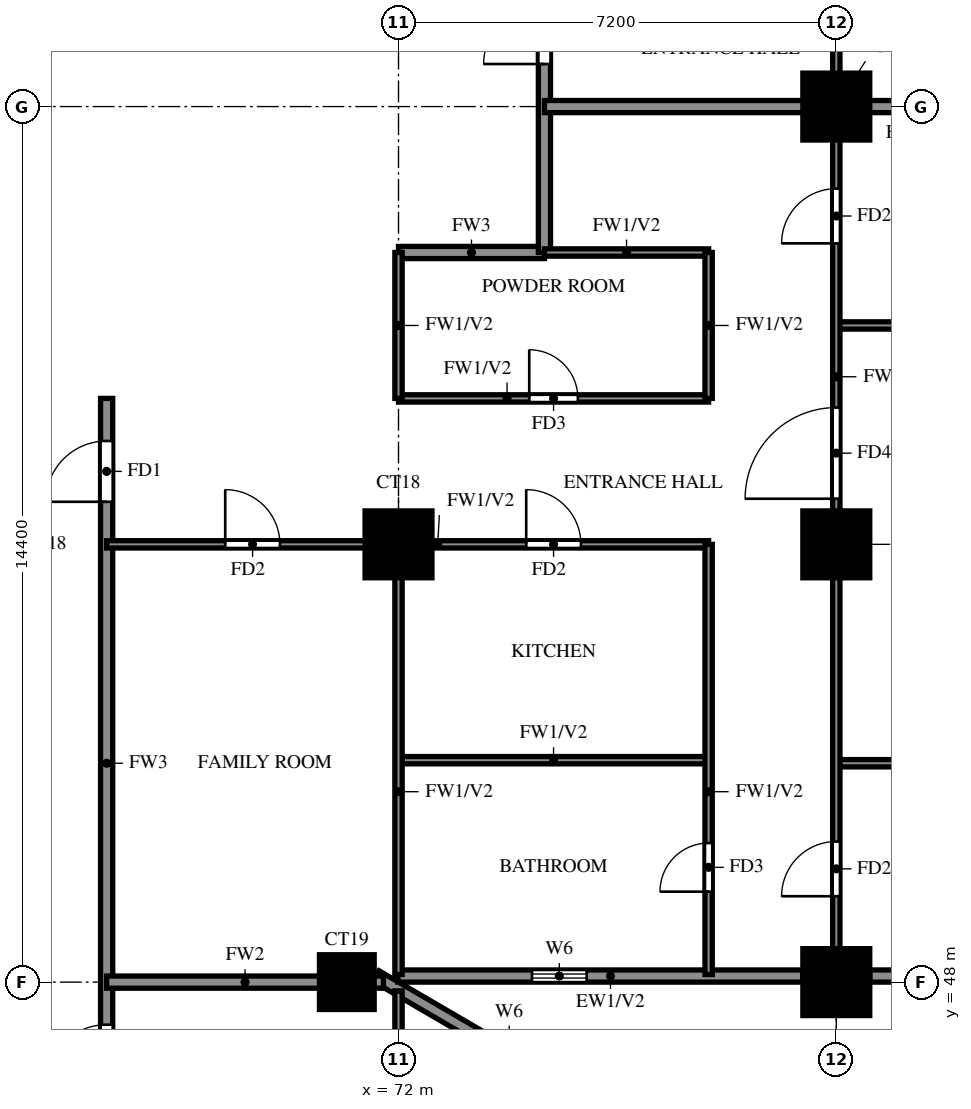
"""IFC4 building model, lengths in metres.
Left out: names, types, materials, properties, quantities, classifications, styles, units other than length and angle.
Written with IfcOpenShell. Run it as: python <this file> out.ifc"""

import sys

from ifc_helpers import new_model, si_unit, direction, frame, frame_2d, origin, origin_2d, place, context, subcontext, project, spatial, rectangle, extrude, source, transform, mapped, element, fill, save


model = new_model("IFC4")
c1 = context("Model", 3, precision=1e-05, world=origin(), true_north=direction((0.0, 1.0)))
c2 = subcontext(c1, "Body", "Model", "MODEL_VIEW")
j1 = project(units=[si_unit("LENGTHUNIT", "METRE"), si_unit("PLANEANGLEUNIT", "RADIAN")], contexts=[c1])
p1 = place(None, origin())
s1 = spatial("IfcSite", under=j1, at=p1, CompositionType="ELEMENT")
p2 = place(p1, origin())
s2 = spatial("IfcBuilding", under=s1, at=p2, CompositionType="ELEMENT")
p3 = place(p2, frame((0.0, 0.0, 130.5)))
s3 = spatial("IfcBuildingStorey", under=s2, at=p3, CompositionType="ELEMENT", Elevation=130.5)
m1 = source(origin(), c2, "Body", "SweptSolid", [
    extrude(rectangle(XDim=0.9, YDim=0.9, at=origin_2d()), origin(), (0.0, 0.0, 1.0), 3.2),
])
p4 = place(p3, frame((71.15, 48.0, 0.0), z_axis=(0.0, 0.0, 1.0), x_axis=(1.0, 0.0, 0.0)))
e1 = element("IfcColumn", 1, at=p4, inside=s3, PredefinedType="COLUMN", context=c2, shape_type="MappedRepresentation", body=[
    mapped(m1, transform((0.0, 0.0, 0.0))),
])
m2 = source(origin(), c2, "Body", "SweptSolid", [
    extrude(rectangle(XDim=1.1, YDim=1.1, at=origin_2d()), origin(), (0.0, 0.0, 1.0), 3.2),
])
for number, where, z_axis, x_axis in (
    (2, (79.2, 48.0, 0.0), (0.0, 0.0, 1.0), (1.0, 0.0, 0.0)),
    (3, (72.0, 55.2, 0.0), (0.0, 0.0, 1.0), (1.0, 0.0, 0.0)),
    (4, (79.2, 55.2, 0.0), (0.0, 0.0, 1.0), (1.0, 0.0, 0.0)),
    (5, (79.2, 62.4, 0.0), (0.0, 0.0, 1.0), (1.0, 0.0, 0.0)),
):
    element("IfcColumn", number, at=place(p3, frame(where, z_axis=z_axis, x_axis=x_axis)), inside=s3, PredefinedType="COLUMN", context=c2, shape_type="MappedRepresentation", body=[
        mapped(m2, transform((0.0, 0.0, 0.0))),
    ])
p5 = place(p3, frame((85.719, 39.881, 0.0), z_axis=(0.0, 0.0, 1.0), x_axis=(-0.86377618652, 0.503875678716, 0.0)))
e6 = element("IfcWall", 6, at=p5, inside=s3, PredefinedType="SOLIDWALL", context=c2, shape_type="SweptSolid", body=[
    extrude(rectangle(XDim=16.311, YDim=0.2, at=frame_2d((8.156, 0.0))), origin(), (0.0, 0.0, 1.0), 3.2),
])
p6 = place(p5, frame((13.326, 0.0, 1.5)))
e7 = element("IfcOpeningElement", 7, at=p6, cuts=e6, PredefinedType="OPENING", context=c2, shape_type="SweptSolid", body=[
    extrude(rectangle(XDim=0.9, YDim=0.9, at=frame_2d((0.45, 0.45))), frame((0.0, 0.11, 0.0), z_axis=(0.0, -1.0, 0.0), x_axis=(1.0, 0.0, 0.0)), (0.0, 0.0, 1.0), 0.22),
])
p7 = place(p3, frame((71.99, 48.1, 0.0), z_axis=(0.0, 0.0, 1.0), x_axis=(1.0, 0.0, 0.0)))
e8 = element("IfcWall", 8, at=p7, inside=s3, PredefinedType="SOLIDWALL", context=c2, shape_type="SweptSolid", body=[
    extrude(rectangle(XDim=6.66, YDim=0.2, at=frame_2d((3.33, 0.0))), origin(), (0.0, 0.0, 1.0), 3.2),
])
p8 = place(p7, frame((2.205, 0.0, 1.5)))
e9 = element("IfcOpeningElement", 9, at=p8, cuts=e8, PredefinedType="OPENING", context=c2, shape_type="SweptSolid", body=[
    extrude(rectangle(XDim=0.9, YDim=0.9, at=frame_2d((0.45, 0.45))), frame((0.0, 0.11, 0.0), z_axis=(0.0, -1.0, 0.0), x_axis=(1.0, 0.0, 0.0)), (0.0, 0.0, 1.0), 0.22),
])
p9 = place(p3, frame((79.75, 48.1, 0.0), z_axis=(0.0, 0.0, 1.0), x_axis=(1.0, 0.0, 0.0)))
e10 = element("IfcWall", 10, at=p9, inside=s3, PredefinedType="SOLIDWALL", context=c2, shape_type="SweptSolid", body=[
    extrude(rectangle(XDim=5.6, YDim=0.2, at=frame_2d((2.8, 0.0))), origin(), (0.0, 0.0, 1.0), 3.2),
])
p10 = place(p9, frame((1.6, 0.0, 0.6)))
e11 = element("IfcOpeningElement", 11, at=p10, cuts=e10, PredefinedType="OPENING", context=c2, shape_type="SweptSolid", body=[
    extrude(rectangle(XDim=2.4, YDim=2.4, at=frame_2d((1.2, 1.2))), frame((0.0, 0.11, 0.0), z_axis=(0.0, -1.0, 0.0), x_axis=(1.0, 0.0, 0.0)), (0.0, 0.0, 1.0), 0.22),
])
p11 = place(p3, frame((72.0, 60.0, 0.0), z_axis=(0.0, 0.0, 1.0), x_axis=(1.0, 0.0, 0.0)))
e12 = element("IfcWall", 12, at=p11, inside=s3, PredefinedType="SOLIDWALL", context=c2, shape_type="SweptSolid", body=[
    extrude(rectangle(XDim=2.4, YDim=0.2, at=frame_2d((1.2, 0.0))), origin(), (0.0, 0.0, 1.0), 3.2),
])
p12 = place(p3, frame((67.2, 45.6, 0.0), z_axis=(0.0, 0.0, 1.0), x_axis=(0.0, 1.0, 0.0)))
e13 = element("IfcWall", 13, at=p12, inside=s3, PredefinedType="SOLIDWALL", context=c2, shape_type="SweptSolid", body=[
    extrude(rectangle(XDim=12.0, YDim=0.2, at=frame_2d((6.0, 0.0))), origin(), (0.0, 0.0, 1.0), 3.2),
])
p13 = place(p12, frame((10.3, 0.0, 0.0)))
e14 = element("IfcOpeningElement", 14, at=p13, cuts=e13, PredefinedType="OPENING", context=c2, shape_type="SweptSolid", body=[
    extrude(rectangle(XDim=1.0, YDim=2.1, at=frame_2d((0.5, 1.05))), frame((0.0, 0.11, 0.0), z_axis=(0.0, -1.0, 0.0), x_axis=(1.0, 0.0, 0.0)), (0.0, 0.0, 1.0), 0.22),
])
p14 = place(p12, frame((0.7, 0.0, 0.0)))
e15 = element("IfcOpeningElement", 15, at=p14, cuts=e13, PredefinedType="OPENING", context=c2, shape_type="SweptSolid", body=[
    extrude(rectangle(XDim=1.0, YDim=2.1, at=frame_2d((0.5, 1.05))), frame((0.0, 0.11, 0.0), z_axis=(0.0, -1.0, 0.0), x_axis=(1.0, 0.0, 0.0)), (0.0, 0.0, 1.0), 0.22),
])
p15 = place(p3, frame((74.4, 60.0, 0.0), z_axis=(0.0, 0.0, 1.0), x_axis=(0.0, 1.0, 0.0)))
e16 = element("IfcWall", 16, at=p15, inside=s3, PredefinedType="SOLIDWALL", context=c2, shape_type="SweptSolid", body=[
    extrude(rectangle(XDim=9.45, YDim=0.2, at=frame_2d((4.725, 0.0))), origin(), (0.0, 0.0, 1.0), 3.2),
])
p16 = place(p15, frame((3.1, 0.0, 0.0)))
e17 = element("IfcOpeningElement", 17, at=p16, cuts=e16, PredefinedType="OPENING", context=c2, shape_type="SweptSolid", body=[
    extrude(rectangle(XDim=1.0, YDim=2.1, at=frame_2d((0.5, 1.05))), frame((0.0, 0.11, 0.0), z_axis=(0.0, -1.0, 0.0), x_axis=(1.0, 0.0, 0.0)), (0.0, 0.0, 1.0), 0.22),
])
p17 = place(p3, frame((67.2, 48.0, 0.0), z_axis=(0.0, 0.0, 1.0), x_axis=(1.0, 0.0, 0.0)))
e18 = element("IfcWall", 18, at=p17, inside=s3, PredefinedType="SOLIDWALL", context=c2, shape_type="SweptSolid", body=[
    extrude(rectangle(XDim=4.552, YDim=0.2, at=frame_2d((2.276, 0.0))), origin(), (0.0, 0.0, 1.0), 3.2),
])
p18 = place(p3, frame((74.4, 62.4, 0.0), z_axis=(0.0, 0.0, 1.0), x_axis=(1.0, 0.0, 0.0)))
e19 = element("IfcWall", 19, at=p18, inside=s3, PredefinedType="SOLIDWALL", context=c2, shape_type="SweptSolid", body=[
    extrude(rectangle(XDim=11.875, YDim=0.2, at=frame_2d((5.938, 0.0))), origin(), (0.0, 0.0, 1.0), 3.2),
])
p19 = place(p3, frame((79.2, 51.6, 0.0), z_axis=(0.0, 0.0, 1.0), x_axis=(1.0, 0.0, 0.0)))
e20 = element("IfcWall", 20, at=p19, inside=s3, PredefinedType="PARTITIONING", context=c2, shape_type="SweptSolid", body=[
    extrude(rectangle(XDim=7.075, YDim=0.12, at=frame_2d((3.538, 0.0))), origin(), (0.0, 0.0, 1.0), 2.3),
])
p20 = place(p3, frame((72.0, 51.65, 0.0), z_axis=(0.0, 0.0, 1.0), x_axis=(1.0, 0.0, 0.0)))
e21 = element("IfcWall", 21, at=p20, inside=s3, PredefinedType="PARTITIONING", context=c2, shape_type="SweptSolid", body=[
    extrude(rectangle(XDim=5.1, YDim=0.12, at=frame_2d((2.55, 0.0))), origin(), (0.0, 0.0, 1.0), 3.2),
])
p21 = place(p3, frame((67.2, 55.2, 0.0), z_axis=(0.0, 0.0, 1.0), x_axis=(1.0, 0.0, 0.0)))
e22 = element("IfcWall", 22, at=p21, inside=s3, PredefinedType="PARTITIONING", context=c2, shape_type="SweptSolid", body=[
    extrude(rectangle(XDim=9.9, YDim=0.12, at=frame_2d((4.95, 0.0))), origin(), (0.0, 0.0, 1.0), 3.2),
])
p22 = place(p21, frame((6.9, 0.0, 0.0)))
e23 = element("IfcOpeningElement", 23, at=p22, cuts=e22, PredefinedType="OPENING", context=c2, shape_type="SweptSolid", body=[
    extrude(rectangle(XDim=0.9, YDim=2.1, at=frame_2d((0.45, 1.05))), frame((0.0, 0.07, 0.0), z_axis=(0.0, -1.0, 0.0), x_axis=(1.0, 0.0, 0.0)), (0.0, 0.0, 1.0), 0.14),
])
p23 = place(p21, frame((1.95, 0.0, 0.0)))
e24 = element("IfcOpeningElement", 24, at=p23, cuts=e22, PredefinedType="OPENING", context=c2, shape_type="SweptSolid", body=[
    extrude(rectangle(XDim=0.9, YDim=2.1, at=frame_2d((0.45, 1.05))), frame((0.0, 0.07, 0.0), z_axis=(0.0, -1.0, 0.0), x_axis=(1.0, 0.0, 0.0)), (0.0, 0.0, 1.0), 0.14),
])
p24 = place(p3, frame((72.0, 57.6, 0.0), z_axis=(0.0, 0.0, 1.0), x_axis=(1.0, 0.0, 0.0)))
e25 = element("IfcWall", 25, at=p24, inside=s3, PredefinedType="PARTITIONING", context=c2, shape_type="SweptSolid", body=[
    extrude(rectangle(XDim=5.1, YDim=0.12, at=frame_2d((2.55, 0.0))), origin(), (0.0, 0.0, 1.0), 3.2),
])
p25 = place(p24, frame((2.15, 0.0, 0.0)))
e26 = element("IfcOpeningElement", 26, at=p25, cuts=e25, PredefinedType="OPENING", context=c2, shape_type="SweptSolid", body=[
    extrude(rectangle(XDim=0.8, YDim=2.1, at=frame_2d((0.4, 1.05))), frame((0.0, 0.07, 0.0), z_axis=(0.0, -1.0, 0.0), x_axis=(1.0, 0.0, 0.0)), (0.0, 0.0, 1.0), 0.14),
])
p26 = place(p3, frame((79.2, 58.8, 0.0), z_axis=(0.0, 0.0, 1.0), x_axis=(1.0, 0.0, 0.0)))
e27 = element("IfcWall", 27, at=p26, inside=s3, PredefinedType="PARTITIONING", context=c2, shape_type="SweptSolid", body=[
    extrude(rectangle(XDim=7.075, YDim=0.12, at=frame_2d((3.538, 0.0))), origin(), (0.0, 0.0, 1.0), 2.3),
])
p27 = place(p3, frame((74.4, 60.0, 0.0), z_axis=(0.0, 0.0, 1.0), x_axis=(1.0, 0.0, 0.0)))
e28 = element("IfcWall", 28, at=p27, inside=s3, PredefinedType="PARTITIONING", context=c2, shape_type="SweptSolid", body=[
    extrude(rectangle(XDim=2.7, YDim=0.12, at=frame_2d((1.35, 0.0))), origin(), (0.0, 0.0, 1.0), 3.2),
])
p28 = place(p3, frame((72.0, 39.725, 0.0), z_axis=(0.0, 0.0, 1.0), x_axis=(0.0, 1.0, 0.0)))
e29 = element("IfcWall", 29, at=p28, inside=s3, PredefinedType="PARTITIONING", context=c2, shape_type="SweptSolid", body=[
    extrude(rectangle(XDim=8.13, YDim=0.12, at=frame_2d((4.065, 0.0))), origin(), (0.0, 0.0, 1.0), 2.3),
])
p29 = place(p28, frame((1.788, 0.0, 0.0)))
e30 = element("IfcOpeningElement", 30, at=p29, cuts=e29, PredefinedType="OPENING", context=c2, shape_type="SweptSolid", body=[
    extrude(rectangle(XDim=0.9, YDim=2.1, at=frame_2d((0.45, 1.05))), frame((0.0, 0.07, 0.0), z_axis=(0.0, -1.0, 0.0), x_axis=(1.0, 0.0, 0.0)), (0.0, 0.0, 1.0), 0.14),
])
p30 = place(p28, frame((4.575, 0.0, 0.0)))
e31 = element("IfcOpeningElement", 31, at=p30, cuts=e29, PredefinedType="OPENING", context=c2, shape_type="SweptSolid", body=[
    extrude(rectangle(XDim=0.8, YDim=2.1, at=frame_2d((0.4, 1.05))), frame((0.0, 0.07, 0.0), z_axis=(0.0, -1.0, 0.0), x_axis=(1.0, 0.0, 0.0)), (0.0, 0.0, 1.0), 0.14),
])
p31 = place(p3, frame((72.0, 48.125, 0.0), z_axis=(0.0, 0.0, 1.0), x_axis=(0.0, 1.0, 0.0)))
e32 = element("IfcWall", 32, at=p31, inside=s3, PredefinedType="PARTITIONING", context=c2, shape_type="SweptSolid", body=[
    extrude(rectangle(XDim=7.075, YDim=0.12, at=frame_2d((3.538, 0.0))), origin(), (0.0, 0.0, 1.0), 3.2),
])
p32 = place(p3, frame((72.0, 57.6, 0.0), z_axis=(0.0, 0.0, 1.0), x_axis=(0.0, 1.0, 0.0)))
e33 = element("IfcWall", 33, at=p32, inside=s3, PredefinedType="PARTITIONING", context=c2, shape_type="SweptSolid", body=[
    extrude(rectangle(XDim=2.4, YDim=0.12, at=frame_2d((1.2, 0.0))), origin(), (0.0, 0.0, 1.0), 3.2),
])
p33 = place(p3, frame((77.1, 48.125, 0.0), z_axis=(0.0, 0.0, 1.0), x_axis=(0.0, 1.0, 0.0)))
e34 = element("IfcWall", 34, at=p33, inside=s3, PredefinedType="PARTITIONING", context=c2, shape_type="SweptSolid", body=[
    extrude(rectangle(XDim=7.075, YDim=0.12, at=frame_2d((3.538, 0.0))), origin(), (0.0, 0.0, 1.0), 3.2),
])
p34 = place(p33, frame((1.363, 0.0, 0.0)))
e35 = element("IfcOpeningElement", 35, at=p34, cuts=e34, PredefinedType="OPENING", context=c2, shape_type="SweptSolid", body=[
    extrude(rectangle(XDim=0.8, YDim=2.1, at=frame_2d((0.4, 1.05))), frame((0.0, 0.07, 0.0), z_axis=(0.0, -1.0, 0.0), x_axis=(1.0, 0.0, 0.0)), (0.0, 0.0, 1.0), 0.14),
])
p35 = place(p3, frame((77.1, 57.6, 0.0), z_axis=(0.0, 0.0, 1.0), x_axis=(0.0, 1.0, 0.0)))
e36 = element("IfcWall", 36, at=p35, inside=s3, PredefinedType="PARTITIONING", context=c2, shape_type="SweptSolid", body=[
    extrude(rectangle(XDim=2.4, YDim=0.12, at=frame_2d((1.2, 0.0))), origin(), (0.0, 0.0, 1.0), 3.2),
])
p36 = place(p3, frame((79.2, 48.125, 0.0), z_axis=(0.0, 0.0, 1.0), x_axis=(0.0, 1.0, 0.0)))
e37 = element("IfcWall", 37, at=p36, inside=s3, PredefinedType="PARTITIONING", context=c2, shape_type="SweptSolid", body=[
    extrude(rectangle(XDim=17.875, YDim=0.12, at=frame_2d((8.938, 0.0))), origin(), (0.0, 0.0, 1.0), 3.2),
])
p37 = place(p36, frame((1.288, 0.0, 0.0)))
e38 = element("IfcOpeningElement", 38, at=p37, cuts=e37, PredefinedType="OPENING", context=c2, shape_type="SweptSolid", body=[
    extrude(rectangle(XDim=0.9, YDim=2.1, at=frame_2d((0.45, 1.05))), frame((0.0, 0.07, 0.0), z_axis=(0.0, -1.0, 0.0), x_axis=(1.0, 0.0, 0.0)), (0.0, 0.0, 1.0), 0.14),
])
p38 = place(p36, frame((7.825, 0.0, 0.0)))
e39 = element("IfcOpeningElement", 39, at=p38, cuts=e37, PredefinedType="OPENING", context=c2, shape_type="SweptSolid", body=[
    extrude(rectangle(XDim=1.5, YDim=2.1, at=frame_2d((0.75, 1.05))), frame((0.0, 0.07, 0.0), z_axis=(0.0, -1.0, 0.0), x_axis=(1.0, 0.0, 0.0)), (0.0, 0.0, 1.0), 0.14),
])
p39 = place(p36, frame((12.025, 0.0, 0.0)))
e40 = element("IfcOpeningElement", 40, at=p39, cuts=e37, PredefinedType="OPENING", context=c2, shape_type="SweptSolid", body=[
    extrude(rectangle(XDim=0.9, YDim=2.1, at=frame_2d((0.45, 1.05))), frame((0.0, 0.07, 0.0), z_axis=(0.0, -1.0, 0.0), x_axis=(1.0, 0.0, 0.0)), (0.0, 0.0, 1.0), 0.14),
])
p40 = place(p36, frame((15.625, 0.0, 0.0)))
e41 = element("IfcOpeningElement", 41, at=p40, cuts=e37, PredefinedType="OPENING", context=c2, shape_type="SweptSolid", body=[
    extrude(rectangle(XDim=0.9, YDim=2.1, at=frame_2d((0.45, 1.05))), frame((0.0, 0.07, 0.0), z_axis=(0.0, -1.0, 0.0), x_axis=(1.0, 0.0, 0.0)), (0.0, 0.0, 1.0), 0.14),
])
p41 = place(p8, origin())
e42 = element("IfcWindow", 42, at=p41, inside=s3, PartitioningType="SINGLE_PANEL", PredefinedType="WINDOW", context=c2, shape_type="SweptSolid", body=[
    extrude(rectangle(XDim=0.9, YDim=0.9, at=frame_2d((0.45, 0.45))), frame((0.0, 0.03, 0.0), z_axis=(0.0, -1.0, 0.0), x_axis=(1.0, 0.0, 0.0)), (0.0, 0.0, 1.0), 0.06),
])
fill(e9, e42)
p42 = place(p13, origin())
e43 = element("IfcDoor", 43, at=p42, inside=s3, OperationType="SINGLE_SWING_LEFT", PredefinedType="DOOR", context=c2, shape_type="SweptSolid", body=[
    extrude(rectangle(XDim=1.0, YDim=2.1, at=frame_2d((0.5, 1.05))), frame((0.0, 0.025, 0.0), z_axis=(0.0, -1.0, 0.0), x_axis=(1.0, 0.0, 0.0)), (0.0, 0.0, 1.0), 0.05),
])
fill(e14, e43)
p43 = place(p37, origin())
e44 = element("IfcDoor", 44, at=p43, inside=s3, OperationType="SINGLE_SWING_LEFT", PredefinedType="DOOR", context=c2, shape_type="SweptSolid", body=[
    extrude(rectangle(XDim=0.9, YDim=2.1, at=frame_2d((0.45, 1.05))), frame((0.0, 0.025, 0.0), z_axis=(0.0, -1.0, 0.0), x_axis=(1.0, 0.0, 0.0)), (0.0, 0.0, 1.0), 0.05),
])
fill(e38, e44)
p44 = place(p38, origin())
e45 = element("IfcDoor", 45, at=p44, inside=s3, OperationType="SINGLE_SWING_LEFT", PredefinedType="DOOR", context=c2, shape_type="SweptSolid", body=[
    extrude(rectangle(XDim=1.5, YDim=2.1, at=frame_2d((0.75, 1.05))), frame((0.0, 0.025, 0.0), z_axis=(0.0, -1.0, 0.0), x_axis=(1.0, 0.0, 0.0)), (0.0, 0.0, 1.0), 0.05),
])
fill(e39, e45)
p45 = place(p39, origin())
e46 = element("IfcDoor", 46, at=p45, inside=s3, OperationType="SINGLE_SWING_LEFT", PredefinedType="DOOR", context=c2, shape_type="SweptSolid", body=[
    extrude(rectangle(XDim=0.9, YDim=2.1, at=frame_2d((0.45, 1.05))), frame((0.0, 0.025, 0.0), z_axis=(0.0, -1.0, 0.0), x_axis=(1.0, 0.0, 0.0)), (0.0, 0.0, 1.0), 0.05),
])
fill(e40, e46)
p46 = place(p34, origin())
e47 = element("IfcDoor", 47, at=p46, inside=s3, OperationType="SINGLE_SWING_LEFT", PredefinedType="DOOR", context=c2, shape_type="SweptSolid", body=[
    extrude(rectangle(XDim=0.8, YDim=2.1, at=frame_2d((0.4, 1.05))), frame((0.0, 0.025, 0.0), z_axis=(0.0, -1.0, 0.0), x_axis=(1.0, 0.0, 0.0)), (0.0, 0.0, 1.0), 0.05),
])
fill(e35, e47)
p47 = place(p22, origin())
e48 = element("IfcDoor", 48, at=p47, inside=s3, OperationType="SINGLE_SWING_RIGHT", PredefinedType="DOOR", context=c2, shape_type="SweptSolid", body=[
    extrude(rectangle(XDim=0.9, YDim=2.1, at=frame_2d((0.45, 1.05))), frame((0.0, 0.025, 0.0), z_axis=(0.0, -1.0, 0.0), x_axis=(1.0, 0.0, 0.0)), (0.0, 0.0, 1.0), 0.05),
])
fill(e23, e48)
p48 = place(p25, origin())
e49 = element("IfcDoor", 49, at=p48, inside=s3, OperationType="SINGLE_SWING_LEFT", PredefinedType="DOOR", context=c2, shape_type="SweptSolid", body=[
    extrude(rectangle(XDim=0.8, YDim=2.1, at=frame_2d((0.4, 1.05))), frame((0.0, 0.025, 0.0), z_axis=(0.0, -1.0, 0.0), x_axis=(1.0, 0.0, 0.0)), (0.0, 0.0, 1.0), 0.05),
])
fill(e26, e49)
p49 = place(p23, origin())
e50 = element("IfcDoor", 50, at=p49, inside=s3, OperationType="SINGLE_SWING_LEFT", PredefinedType="DOOR", context=c2, shape_type="SweptSolid", body=[
    extrude(rectangle(XDim=0.9, YDim=2.1, at=frame_2d((0.45, 1.05))), frame((0.0, 0.025, 0.0), z_axis=(0.0, -1.0, 0.0), x_axis=(1.0, 0.0, 0.0)), (0.0, 0.0, 1.0), 0.05),
])
fill(e24, e50)
p50 = place(p16, origin())
e51 = element("IfcDoor", 51, at=p50, inside=s3, OperationType="SINGLE_SWING_LEFT", PredefinedType="DOOR", context=c2, shape_type="SweptSolid", body=[
    extrude(rectangle(XDim=1.0, YDim=2.1, at=frame_2d((0.5, 1.05))), frame((0.0, 0.025, 0.0), z_axis=(0.0, -1.0, 0.0), x_axis=(1.0, 0.0, 0.0)), (0.0, 0.0, 1.0), 0.05),
])
fill(e17, e51)
p51 = place(p14, origin())
e52 = element("IfcDoor", 52, at=p51, inside=s3, OperationType="SINGLE_SWING_LEFT", PredefinedType="DOOR", context=c2, shape_type="SweptSolid", body=[
    extrude(rectangle(XDim=1.0, YDim=2.1, at=frame_2d((0.5, 1.05))), frame((0.0, 0.025, 0.0), z_axis=(0.0, -1.0, 0.0), x_axis=(1.0, 0.0, 0.0)), (0.0, 0.0, 1.0), 0.05),
])
fill(e15, e52)
save(model, sys.argv[1])
